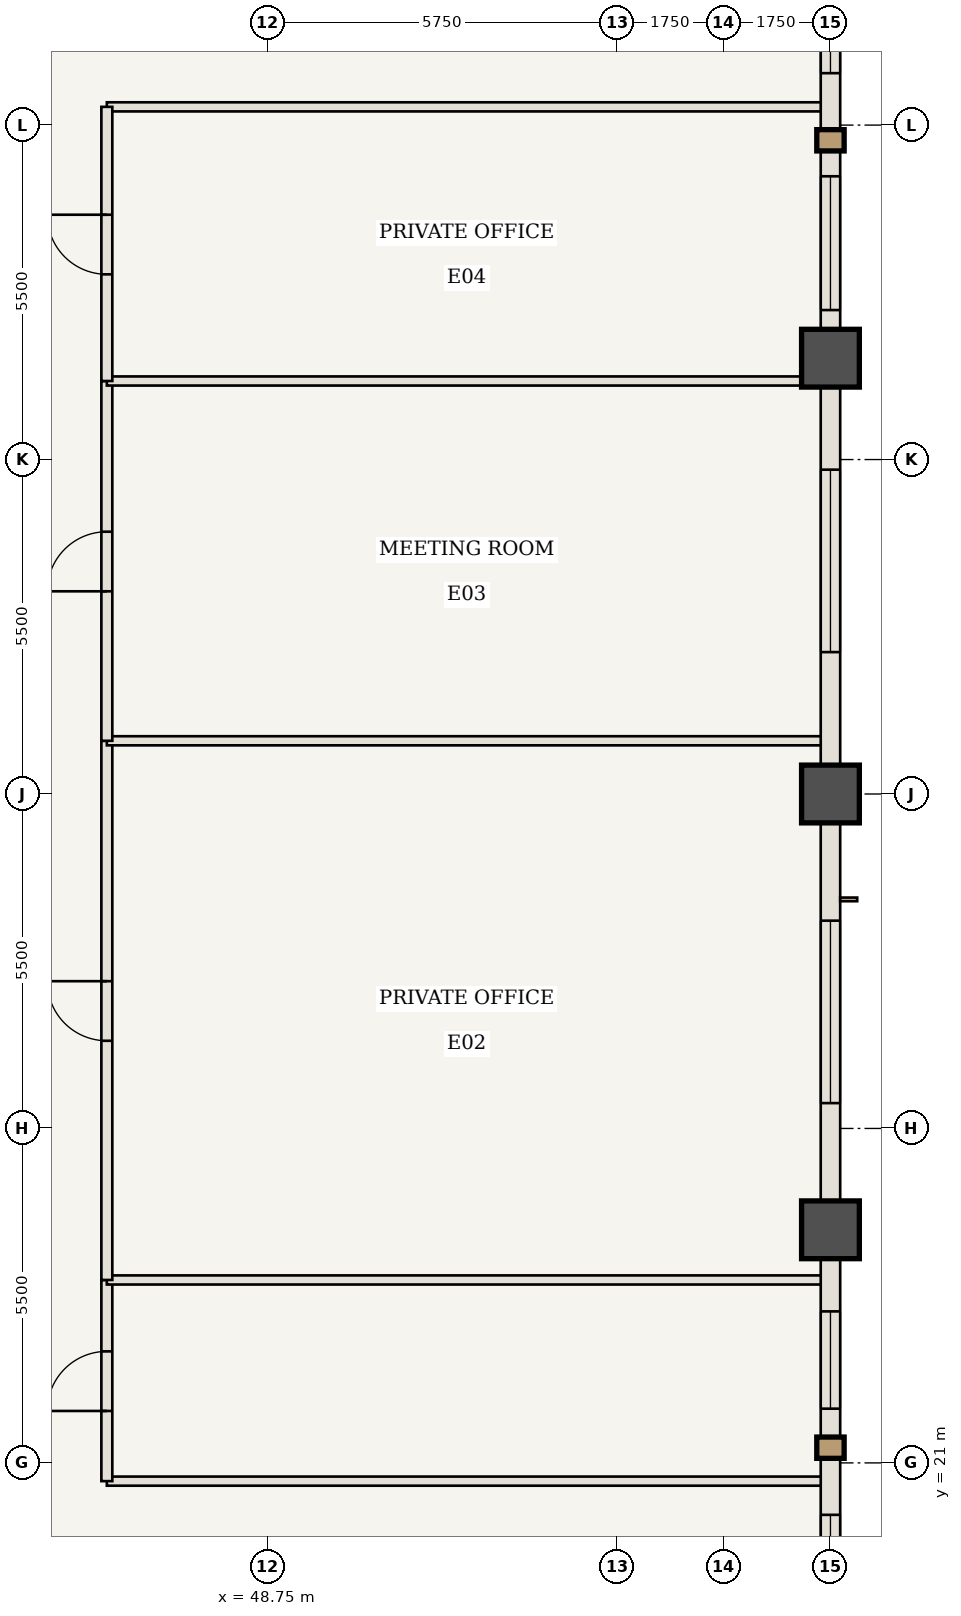
"""IFC4 building model, lengths in metres.
Left out: names, types, materials, properties, quantities, classifications, styles, units other than length and angle.
Written with IfcOpenShell. Run it as: python <this file> out.ifc"""

import sys

from ifc_helpers import new_model, si_unit, direction, frame, frame_2d, origin, origin_2d, place, context, subcontext, project, spatial, rectangle, extrude, element, fill, save


model = new_model("IFC4")
c1 = context("Model", 3, precision=1e-05, world=origin(), true_north=direction((0.0, 1.0)))
c2 = subcontext(c1, "Body", "Model", "MODEL_VIEW")
j1 = project(units=[si_unit("LENGTHUNIT", "METRE"), si_unit("PLANEANGLEUNIT", "RADIAN")], contexts=[c1])
p1 = place(None, origin())
s1 = spatial("IfcSite", under=j1, at=p1, CompositionType="ELEMENT")
p2 = place(p1, origin())
s2 = spatial("IfcBuilding", under=s1, at=p2, CompositionType="ELEMENT")
p3 = place(p2, frame((0.0, 0.0, 149.1)))
s3 = spatial("IfcBuildingStorey", under=s2, at=p3, CompositionType="ELEMENT", Elevation=149.1)
for number, where, z_axis, x_axis in (
    (1, (58.0, 24.833, 0.0), (0.0, 0.0, 1.0), (1.0, 0.0, 0.0)),
    (2, (58.0, 32.0, 0.0), (0.0, 0.0, 1.0), (1.0, 0.0, 0.0)),
    (3, (58.0, 39.167, 0.0), (0.0, 0.0, 1.0), (1.0, 0.0, 0.0)),
):
    element("IfcColumn", number, at=place(p3, frame(where, z_axis=z_axis, x_axis=x_axis)), inside=s3, PredefinedType="COLUMN", context=c2, shape_type="SweptSolid", body=[
        extrude(rectangle(XDim=0.95, YDim=0.95, at=origin_2d()), origin(), (0.0, 0.0, 1.0), 3.85),
    ])
for number, where, z_axis, x_axis in (
    (4, (46.1, 20.7, 0.0), (0.0, 0.0, 1.0), (1.0, 0.0, 0.0)),
    (5, (46.1, 43.3, 0.0), (0.0, 0.0, 1.0), (1.0, 0.0, 0.0)),
):
    element("IfcWall", number, at=place(p3, frame(where, z_axis=z_axis, x_axis=x_axis)), inside=s3, PredefinedType="STANDARD", context=c2, shape_type="SweptSolid", body=[
        extrude(rectangle(XDim=11.84, YDim=0.15, at=frame_2d((5.92, 0.0))), origin(), (0.0, 0.0, 1.0), 3.065),
    ])
p4 = place(p3, frame((46.1, 20.7, 0.0), z_axis=(0.0, 0.0, 1.0), x_axis=(0.0, 1.0, 0.0)))
e6 = element("IfcWall", 6, at=p4, inside=s3, PredefinedType="STANDARD", context=c2, shape_type="SweptSolid", body=[
    extrude(rectangle(XDim=3.308, YDim=0.18, at=frame_2d((1.654, 0.0))), origin(), (0.0, 0.0, 1.0), 3.685),
])
p5 = place(p4, frame((1.154, 0.0, 0.0)))
e7 = element("IfcOpeningElement", 7, at=p5, cuts=e6, PredefinedType="OPENING", context=c2, shape_type="SweptSolid", body=[
    extrude(rectangle(XDim=0.98, YDim=2.2, at=frame_2d((0.49, 1.1))), frame((0.0, 0.1, 0.0), z_axis=(0.0, -1.0, 0.0), x_axis=(1.0, 0.0, 0.0)), (0.0, 0.0, 1.0), 0.2),
])
p6 = place(p3, frame((46.1, 24.008, 0.0), z_axis=(0.0, 0.0, 1.0), x_axis=(1.0, 0.0, 0.0)))
e8 = element("IfcWall", 8, at=p6, inside=s3, PredefinedType="STANDARD", context=c2, shape_type="SweptSolid", body=[
    extrude(rectangle(XDim=11.84, YDim=0.15, at=frame_2d((5.92, 0.0))), origin(), (0.0, 0.0, 1.0), 3.685),
])
p7 = place(p3, frame((46.1, 24.008, 0.0), z_axis=(0.0, 0.0, 1.0), x_axis=(0.0, 1.0, 0.0)))
e9 = element("IfcWall", 9, at=p7, inside=s3, PredefinedType="STANDARD", context=c2, shape_type="SweptSolid", body=[
    extrude(rectangle(XDim=8.867, YDim=0.18, at=frame_2d((4.433, 0.0))), origin(), (0.0, 0.0, 1.0), 3.685),
])
p8 = place(p7, frame((3.933, 0.0, 0.0)))
e10 = element("IfcOpeningElement", 10, at=p8, cuts=e9, PredefinedType="OPENING", context=c2, shape_type="SweptSolid", body=[
    extrude(rectangle(XDim=0.98, YDim=2.2, at=frame_2d((0.49, 1.1))), frame((0.0, 0.1, 0.0), z_axis=(0.0, -1.0, 0.0), x_axis=(1.0, 0.0, 0.0)), (0.0, 0.0, 1.0), 0.2),
])
p9 = place(p3, frame((46.1, 32.875, 0.0), z_axis=(0.0, 0.0, 1.0), x_axis=(1.0, 0.0, 0.0)))
e11 = element("IfcWall", 11, at=p9, inside=s3, PredefinedType="STANDARD", context=c2, shape_type="SweptSolid", body=[
    extrude(rectangle(XDim=11.84, YDim=0.15, at=frame_2d((5.92, 0.0))), origin(), (0.0, 0.0, 1.0), 3.685),
])
p10 = place(p3, frame((46.1, 32.875, 0.0), z_axis=(0.0, 0.0, 1.0), x_axis=(0.0, 1.0, 0.0)))
e12 = element("IfcWall", 12, at=p10, inside=s3, PredefinedType="STANDARD", context=c2, shape_type="SweptSolid", body=[
    extrude(rectangle(XDim=5.917, YDim=0.18, at=frame_2d((2.958, 0.0))), origin(), (0.0, 0.0, 1.0), 3.685),
])
p11 = place(p10, frame((2.458, 0.0, 0.0)))
e13 = element("IfcOpeningElement", 13, at=p11, cuts=e12, PredefinedType="OPENING", context=c2, shape_type="SweptSolid", body=[
    extrude(rectangle(XDim=0.98, YDim=2.2, at=frame_2d((0.49, 1.1))), frame((0.0, 0.1, 0.0), z_axis=(0.0, -1.0, 0.0), x_axis=(1.0, 0.0, 0.0)), (0.0, 0.0, 1.0), 0.2),
])
p12 = place(p3, frame((46.1, 38.792, 0.0), z_axis=(0.0, 0.0, 1.0), x_axis=(1.0, 0.0, 0.0)))
e14 = element("IfcWall", 14, at=p12, inside=s3, PredefinedType="STANDARD", context=c2, shape_type="SweptSolid", body=[
    extrude(rectangle(XDim=11.84, YDim=0.15, at=frame_2d((5.92, 0.0))), origin(), (0.0, 0.0, 1.0), 3.685),
])
p13 = place(p3, frame((46.1, 38.792, 0.0), z_axis=(0.0, 0.0, 1.0), x_axis=(0.0, 1.0, 0.0)))
e15 = element("IfcWall", 15, at=p13, inside=s3, PredefinedType="STANDARD", context=c2, shape_type="SweptSolid", body=[
    extrude(rectangle(XDim=4.508, YDim=0.18, at=frame_2d((2.254, 0.0))), origin(), (0.0, 0.0, 1.0), 3.685),
])
p14 = place(p13, frame((1.754, 0.0, 0.0)))
e16 = element("IfcOpeningElement", 16, at=p14, cuts=e15, PredefinedType="OPENING", context=c2, shape_type="SweptSolid", body=[
    extrude(rectangle(XDim=0.98, YDim=2.2, at=frame_2d((0.49, 1.1))), frame((0.0, 0.1, 0.0), z_axis=(0.0, -1.0, 0.0), x_axis=(1.0, 0.0, 0.0)), (0.0, 0.0, 1.0), 0.2),
])
p15 = place(p3, frame((58.0, 24.833, 0.0), z_axis=(0.0, 0.0, 1.0), x_axis=(0.0, -1.0, 0.0)))
e17 = element("IfcWall", 17, at=p15, inside=s3, PredefinedType="USERDEFINED", context=c2, shape_type="SweptSolid", body=[
    extrude(rectangle(XDim=7.167, YDim=0.32, at=frame_2d((3.583, 0.0))), origin(), (0.0, 0.0, 1.0), 2.885),
])
p16 = place(p15, frame((1.342, 0.0, 0.85)))
e18 = element("IfcOpeningElement", 18, at=p16, cuts=e17, PredefinedType="OPENING", context=c2, shape_type="SweptSolid", body=[
    extrude(rectangle(XDim=1.6, YDim=1.835, at=frame_2d((0.8, 0.917))), frame((0.0, 0.17, 0.0), z_axis=(0.0, -1.0, 0.0), x_axis=(1.0, 0.0, 0.0)), (0.0, 0.0, 1.0), 0.34),
])
p17 = place(p15, frame((4.688, 0.0, 0.85)))
e19 = element("IfcOpeningElement", 19, at=p17, cuts=e17, PredefinedType="OPENING", context=c2, shape_type="SweptSolid", body=[
    extrude(rectangle(XDim=1.6, YDim=1.835, at=frame_2d((0.8, 0.917))), frame((0.0, 0.17, 0.0), z_axis=(0.0, -1.0, 0.0), x_axis=(1.0, 0.0, 0.0)), (0.0, 0.0, 1.0), 0.34),
])
p18 = place(p3, frame((58.0, 32.0, 0.0), z_axis=(0.0, 0.0, 1.0), x_axis=(0.0, -1.0, 0.0)))
e20 = element("IfcWall", 20, at=p18, inside=s3, PredefinedType="USERDEFINED", context=c2, shape_type="SweptSolid", body=[
    extrude(rectangle(XDim=7.167, YDim=0.32, at=frame_2d((3.583, 0.0))), origin(), (0.0, 0.0, 1.0), 2.885),
])
p19 = place(p18, frame((2.083, 0.0, 0.85)))
e21 = element("IfcOpeningElement", 21, at=p19, cuts=e20, PredefinedType="OPENING", context=c2, shape_type="SweptSolid", body=[
    extrude(rectangle(XDim=3.0, YDim=1.835, at=frame_2d((1.5, 0.917))), frame((0.0, 0.17, 0.0), z_axis=(0.0, -1.0, 0.0), x_axis=(1.0, 0.0, 0.0)), (0.0, 0.0, 1.0), 0.34),
])
p20 = place(p3, frame((58.0, 39.167, 0.0), z_axis=(0.0, 0.0, 1.0), x_axis=(0.0, -1.0, 0.0)))
e22 = element("IfcWall", 22, at=p20, inside=s3, PredefinedType="USERDEFINED", context=c2, shape_type="SweptSolid", body=[
    extrude(rectangle(XDim=7.167, YDim=0.32, at=frame_2d((3.583, 0.0))), origin(), (0.0, 0.0, 1.0), 2.885),
])
p21 = place(p20, frame((1.833, 0.0, 0.85)))
e23 = element("IfcOpeningElement", 23, at=p21, cuts=e22, PredefinedType="OPENING", context=c2, shape_type="SweptSolid", body=[
    extrude(rectangle(XDim=3.0, YDim=1.835, at=frame_2d((1.5, 0.917))), frame((0.0, 0.17, 0.0), z_axis=(0.0, -1.0, 0.0), x_axis=(1.0, 0.0, 0.0)), (0.0, 0.0, 1.0), 0.34),
])
p22 = place(p3, frame((58.0, 46.333, 0.0), z_axis=(0.0, 0.0, 1.0), x_axis=(0.0, -1.0, 0.0)))
e24 = element("IfcWall", 24, at=p22, inside=s3, PredefinedType="USERDEFINED", context=c2, shape_type="SweptSolid", body=[
    extrude(rectangle(XDim=7.167, YDim=0.32, at=frame_2d((3.583, 0.0))), origin(), (0.0, 0.0, 1.0), 2.885),
])
p23 = place(p22, frame((0.879, 0.0, 0.85)))
e25 = element("IfcOpeningElement", 25, at=p23, cuts=e24, PredefinedType="OPENING", context=c2, shape_type="SweptSolid", body=[
    extrude(rectangle(XDim=1.6, YDim=1.835, at=frame_2d((0.8, 0.917))), frame((0.0, 0.17, 0.0), z_axis=(0.0, -1.0, 0.0), x_axis=(1.0, 0.0, 0.0)), (0.0, 0.0, 1.0), 0.34),
])
p24 = place(p22, frame((4.175, 0.0, 0.85)))
e26 = element("IfcOpeningElement", 26, at=p24, cuts=e24, PredefinedType="OPENING", context=c2, shape_type="SweptSolid", body=[
    extrude(rectangle(XDim=2.2, YDim=1.835, at=frame_2d((1.1, 0.917))), frame((0.0, 0.17, 0.0), z_axis=(0.0, -1.0, 0.0), x_axis=(1.0, 0.0, 0.0)), (0.0, 0.0, 1.0), 0.34),
])
p25 = place(p5, origin())
e27 = element("IfcDoor", 27, at=p25, inside=s3, OperationType="SINGLE_SWING_LEFT", PredefinedType="DOOR", context=c2, shape_type="SweptSolid", body=[
    extrude(rectangle(XDim=0.98, YDim=2.2, at=frame_2d((0.49, 1.1))), frame((0.0, 0.025, 0.0), z_axis=(0.0, -1.0, 0.0), x_axis=(1.0, 0.0, 0.0)), (0.0, 0.0, 1.0), 0.05),
])
fill(e7, e27)
p26 = place(p8, origin())
e28 = element("IfcDoor", 28, at=p26, inside=s3, OperationType="SINGLE_SWING_RIGHT", PredefinedType="DOOR", context=c2, shape_type="SweptSolid", body=[
    extrude(rectangle(XDim=0.98, YDim=2.2, at=frame_2d((0.49, 1.1))), frame((0.0, 0.025, 0.0), z_axis=(0.0, -1.0, 0.0), x_axis=(1.0, 0.0, 0.0)), (0.0, 0.0, 1.0), 0.05),
])
fill(e10, e28)
p27 = place(p11, origin())
e29 = element("IfcDoor", 29, at=p27, inside=s3, OperationType="SINGLE_SWING_LEFT", PredefinedType="DOOR", context=c2, shape_type="SweptSolid", body=[
    extrude(rectangle(XDim=0.98, YDim=2.2, at=frame_2d((0.49, 1.1))), frame((0.0, 0.025, 0.0), z_axis=(0.0, -1.0, 0.0), x_axis=(1.0, 0.0, 0.0)), (0.0, 0.0, 1.0), 0.05),
])
fill(e13, e29)
p28 = place(p14, origin())
e30 = element("IfcDoor", 30, at=p28, inside=s3, OperationType="SINGLE_SWING_RIGHT", PredefinedType="DOOR", context=c2, shape_type="SweptSolid", body=[
    extrude(rectangle(XDim=0.98, YDim=2.2, at=frame_2d((0.49, 1.1))), frame((0.0, 0.025, 0.0), z_axis=(0.0, -1.0, 0.0), x_axis=(1.0, 0.0, 0.0)), (0.0, 0.0, 1.0), 0.05),
])
fill(e16, e30)
p29 = place(p16, origin())
e31 = element("IfcWindow", 31, at=p29, inside=s3, PartitioningType="SINGLE_PANEL", PredefinedType="WINDOW", context=c2, shape_type="SweptSolid", body=[
    extrude(rectangle(XDim=1.6, YDim=1.835, at=frame_2d((0.8, 0.917))), frame((0.0, 0.03, 0.0), z_axis=(0.0, -1.0, 0.0), x_axis=(1.0, 0.0, 0.0)), (0.0, 0.0, 1.0), 0.06),
])
fill(e18, e31)
p30 = place(p17, origin())
e32 = element("IfcWindow", 32, at=p30, inside=s3, PartitioningType="SINGLE_PANEL", PredefinedType="WINDOW", context=c2, shape_type="SweptSolid", body=[
    extrude(rectangle(XDim=1.6, YDim=1.835, at=frame_2d((0.8, 0.917))), frame((0.0, 0.03, 0.0), z_axis=(0.0, -1.0, 0.0), x_axis=(1.0, 0.0, 0.0)), (0.0, 0.0, 1.0), 0.06),
])
fill(e19, e32)
p31 = place(p19, origin())
e33 = element("IfcWindow", 33, at=p31, inside=s3, PartitioningType="SINGLE_PANEL", PredefinedType="WINDOW", context=c2, shape_type="SweptSolid", body=[
    extrude(rectangle(XDim=3.0, YDim=1.835, at=frame_2d((1.5, 0.917))), frame((0.0, 0.03, 0.0), z_axis=(0.0, -1.0, 0.0), x_axis=(1.0, 0.0, 0.0)), (0.0, 0.0, 1.0), 0.06),
])
fill(e21, e33)
p32 = place(p21, origin())
e34 = element("IfcWindow", 34, at=p32, inside=s3, PartitioningType="SINGLE_PANEL", PredefinedType="WINDOW", context=c2, shape_type="SweptSolid", body=[
    extrude(rectangle(XDim=3.0, YDim=1.835, at=frame_2d((1.5, 0.917))), frame((0.0, 0.03, 0.0), z_axis=(0.0, -1.0, 0.0), x_axis=(1.0, 0.0, 0.0)), (0.0, 0.0, 1.0), 0.06),
])
fill(e23, e34)
p33 = place(p23, origin())
e35 = element("IfcWindow", 35, at=p33, inside=s3, PartitioningType="SINGLE_PANEL", PredefinedType="WINDOW", context=c2, shape_type="SweptSolid", body=[
    extrude(rectangle(XDim=1.6, YDim=1.835, at=frame_2d((0.8, 0.917))), frame((0.0, 0.03, 0.0), z_axis=(0.0, -1.0, 0.0), x_axis=(1.0, 0.0, 0.0)), (0.0, 0.0, 1.0), 0.06),
])
fill(e25, e35)
p34 = place(p24, origin())
e36 = element("IfcWindow", 36, at=p34, inside=s3, PartitioningType="SINGLE_PANEL", PredefinedType="WINDOW", context=c2, shape_type="SweptSolid", body=[
    extrude(rectangle(XDim=2.2, YDim=1.835, at=frame_2d((1.1, 0.917))), frame((0.0, 0.03, 0.0), z_axis=(0.0, -1.0, 0.0), x_axis=(1.0, 0.0, 0.0)), (0.0, 0.0, 1.0), 0.06),
])
fill(e26, e36)
save(model, sys.argv[1])
